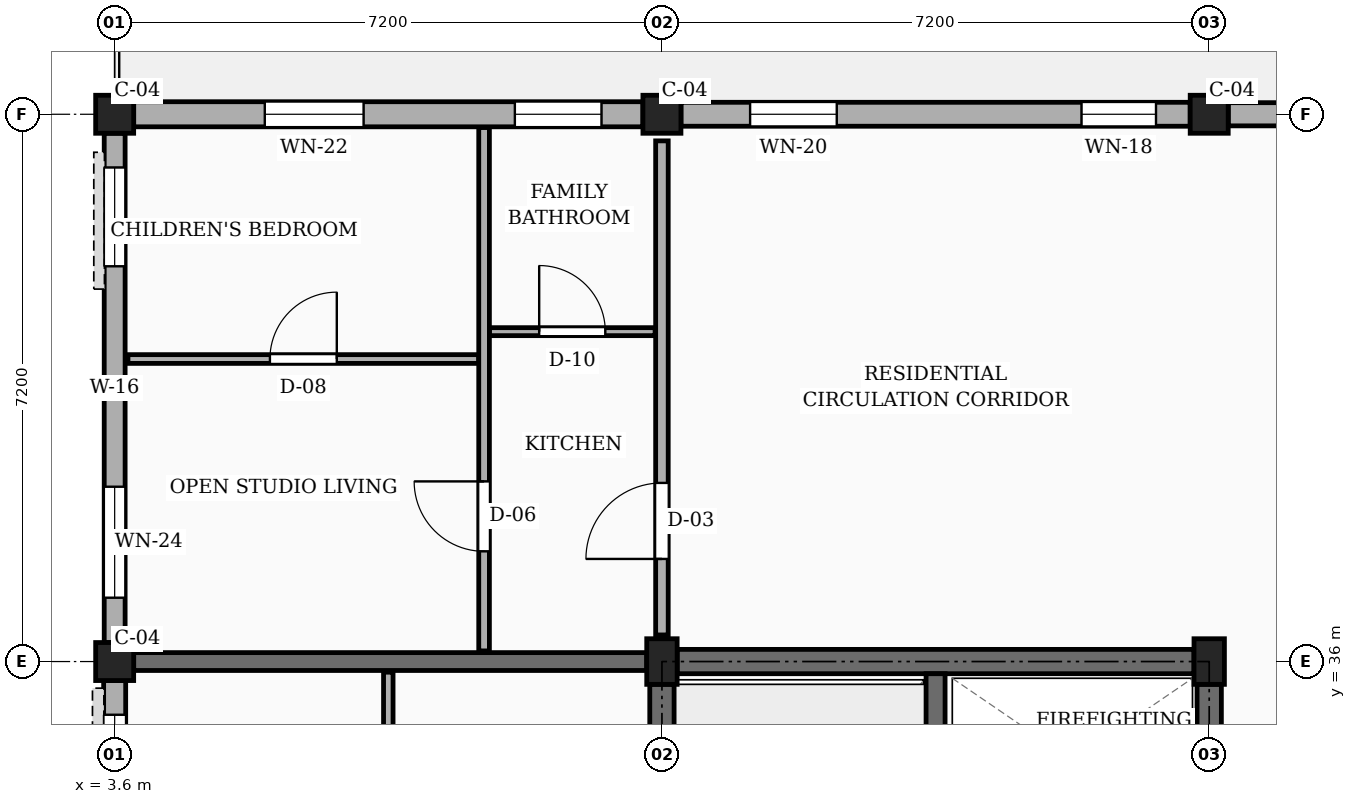
"""IFC4 building model, lengths in metres.
Left out: names, types, materials, properties, quantities, classifications, styles, units other than length and angle.
Written with IfcOpenShell. Run it as: python <this file> out.ifc"""

import sys

from ifc_helpers import new_model, si_unit, direction, frame, frame_2d, origin, origin_2d, place, context, subcontext, project, spatial, rectangle, extrude, element, fill, save


model = new_model("IFC4")
c1 = context("Model", 3, precision=1e-05, world=origin(), true_north=direction((0.0, 1.0)))
c2 = subcontext(c1, "Body", "Model", "MODEL_VIEW")
j1 = project(units=[si_unit("LENGTHUNIT", "METRE"), si_unit("PLANEANGLEUNIT", "RADIAN")], contexts=[c1])
p1 = place(None, origin())
s1 = spatial("IfcSite", under=j1, at=p1, CompositionType="ELEMENT")
p2 = place(p1, origin())
s2 = spatial("IfcBuilding", under=s1, at=p2, CompositionType="ELEMENT")
p3 = place(p2, frame((0.0, 0.0, 23.4)))
s3 = spatial("IfcBuildingStorey", under=s2, at=p3, CompositionType="ELEMENT", Elevation=23.4)
for number, where, z_axis, x_axis in (
    (1, (3.6, 36.0, 0.0), (0.0, 0.0, 1.0), (1.0, 0.0, 0.0)),
    (2, (3.6, 43.2, 0.0), (0.0, 0.0, 1.0), (1.0, 0.0, 0.0)),
):
    element("IfcColumn", number, at=place(p3, frame(where, z_axis=z_axis, x_axis=x_axis)), inside=s3, PredefinedType="COLUMN", context=c2, shape_type="SweptSolid", body=[
        extrude(rectangle(XDim=0.5, YDim=0.5, at=origin_2d()), origin(), (0.0, 0.0, 1.0), 3.15),
    ])
p4 = place(p3, frame((10.8, 36.0, 0.0), z_axis=(0.0, 0.0, 1.0), x_axis=(1.0, 0.0, 0.0)))
e3 = element("IfcColumn", 3, at=p4, inside=s3, PredefinedType="COLUMN", context=c2, shape_type="SweptSolid", body=[
    extrude(rectangle(XDim=0.4, YDim=0.6, at=origin_2d()), origin(), (0.0, 0.0, 1.0), 3.15),
])
p5 = place(p3, frame((10.8, 43.2, 0.0), z_axis=(0.0, 0.0, 1.0), x_axis=(1.0, 0.0, 0.0)))
e4 = element("IfcColumn", 4, at=p5, inside=s3, PredefinedType="COLUMN", context=c2, shape_type="SweptSolid", body=[
    extrude(rectangle(XDim=0.5, YDim=0.5, at=origin_2d()), origin(), (0.0, 0.0, 1.0), 3.15),
])
p6 = place(p3, frame((18.0, 36.0, 0.0), z_axis=(0.0, 0.0, 1.0), x_axis=(1.0, 0.0, 0.0)))
e5 = element("IfcColumn", 5, at=p6, inside=s3, PredefinedType="COLUMN", context=c2, shape_type="SweptSolid", body=[
    extrude(rectangle(XDim=0.4, YDim=0.6, at=origin_2d()), origin(), (0.0, 0.0, 1.0), 3.15),
])
p7 = place(p3, frame((18.0, 43.2, 0.0), z_axis=(0.0, 0.0, 1.0), x_axis=(1.0, 0.0, 0.0)))
e6 = element("IfcColumn", 6, at=p7, inside=s3, PredefinedType="COLUMN", context=c2, shape_type="SweptSolid", body=[
    extrude(rectangle(XDim=0.5, YDim=0.5, at=origin_2d()), origin(), (0.0, 0.0, 1.0), 3.15),
])
p8 = place(p3, frame((3.85, 36.0, 0.0), z_axis=(0.0, 0.0, 1.0), x_axis=(1.0, 0.0, 0.0)))
e7 = element("IfcWall", 7, at=p8, inside=s3, PredefinedType="SOLIDWALL", context=c2, shape_type="SweptSolid", body=[
    extrude(rectangle(XDim=6.75, YDim=0.235, at=frame_2d((3.375, 0.0))), origin(), (0.0, 0.0, 1.0), 2.17),
])
p9 = place(p3, frame((24.95, 43.2, 0.0), z_axis=(0.0, 0.0, 1.0), x_axis=(-1.0, 0.0, 0.0)))
e8 = element("IfcWall", 8, at=p9, inside=s3, PredefinedType="SOLIDWALL", context=c2, shape_type="SweptSolid", body=[
    extrude(rectangle(XDim=6.7, YDim=0.305, at=frame_2d((3.35, 0.0))), origin(), (0.0, 0.0, 1.0), 2.44),
])
p10 = place(p9, frame((2.8, 0.0, 0.0)))
e9 = element("IfcOpeningElement", 9, at=p10, cuts=e8, PredefinedType="OPENING", context=c2, shape_type="SweptSolid", body=[
    extrude(rectangle(XDim=1.44, YDim=2.12, at=frame_2d((0.72, 1.06))), frame((0.0, 0.163, 0.0), z_axis=(0.0, -1.0, 0.0), x_axis=(1.0, 0.0, 0.0)), (0.0, 0.0, 1.0), 0.325),
])
p11 = place(p9, frame((0.65, 0.0, 0.78)))
e10 = element("IfcOpeningElement", 10, at=p11, cuts=e8, PredefinedType="OPENING", context=c2, shape_type="SweptSolid", body=[
    extrude(rectangle(XDim=1.16, YDim=1.15, at=frame_2d((0.58, 0.575))), frame((0.0, 0.163, 0.0), z_axis=(0.0, -1.0, 0.0), x_axis=(1.0, 0.0, 0.0)), (0.0, 0.0, 1.0), 0.325),
])
p12 = place(p3, frame((17.75, 43.2, 0.0), z_axis=(0.0, 0.0, 1.0), x_axis=(-1.0, 0.0, 0.0)))
e11 = element("IfcWall", 11, at=p12, inside=s3, PredefinedType="SOLIDWALL", context=c2, shape_type="SweptSolid", body=[
    extrude(rectangle(XDim=6.7, YDim=0.315, at=frame_2d((3.35, 0.0))), origin(), (0.0, 0.0, 1.0), 2.44),
])
p13 = place(p12, frame((0.45, 0.0, 0.78)))
e12 = element("IfcOpeningElement", 12, at=p13, cuts=e11, PredefinedType="OPENING", context=c2, shape_type="SweptSolid", body=[
    extrude(rectangle(XDim=0.98, YDim=1.36, at=frame_2d((0.49, 0.68))), frame((0.0, 0.167, 0.0), z_axis=(0.0, -1.0, 0.0), x_axis=(1.0, 0.0, 0.0)), (0.0, 0.0, 1.0), 0.335),
])
p14 = place(p12, frame((4.65, 0.0, 0.78)))
e13 = element("IfcOpeningElement", 13, at=p14, cuts=e11, PredefinedType="OPENING", context=c2, shape_type="SweptSolid", body=[
    extrude(rectangle(XDim=1.14, YDim=1.36, at=frame_2d((0.57, 0.68))), frame((0.0, 0.167, 0.0), z_axis=(0.0, -1.0, 0.0), x_axis=(1.0, 0.0, 0.0)), (0.0, 0.0, 1.0), 0.335),
])
p15 = place(p3, frame((10.55, 43.2, 0.0), z_axis=(0.0, 0.0, 1.0), x_axis=(-1.0, 0.0, 0.0)))
e14 = element("IfcWall", 14, at=p15, inside=s3, PredefinedType="SOLIDWALL", context=c2, shape_type="SweptSolid", body=[
    extrude(rectangle(XDim=6.7, YDim=0.33, at=frame_2d((3.35, 0.0))), origin(), (0.0, 0.0, 1.0), 2.44),
])
p16 = place(p15, frame((0.545, 0.0, 0.78)))
e15 = element("IfcOpeningElement", 15, at=p16, cuts=e14, PredefinedType="OPENING", context=c2, shape_type="SweptSolid", body=[
    extrude(rectangle(XDim=1.14, YDim=1.36, at=frame_2d((0.57, 0.68))), frame((0.0, 0.175, 0.0), z_axis=(0.0, -1.0, 0.0), x_axis=(1.0, 0.0, 0.0)), (0.0, 0.0, 1.0), 0.35),
])
p17 = place(p15, frame((3.675, 0.0, 0.78)))
e16 = element("IfcOpeningElement", 16, at=p17, cuts=e14, PredefinedType="OPENING", context=c2, shape_type="SweptSolid", body=[
    extrude(rectangle(XDim=1.3, YDim=1.36, at=frame_2d((0.65, 0.68))), frame((0.0, 0.175, 0.0), z_axis=(0.0, -1.0, 0.0), x_axis=(1.0, 0.0, 0.0)), (0.0, 0.0, 1.0), 0.35),
])
p18 = place(p3, frame((3.6, 42.95, 0.0), z_axis=(0.0, 0.0, 1.0), x_axis=(0.0, -1.0, 0.0)))
e17 = element("IfcWall", 17, at=p18, inside=s3, PredefinedType="SOLIDWALL", context=c2, shape_type="SweptSolid", body=[
    extrude(rectangle(XDim=6.7, YDim=0.275, at=frame_2d((3.35, 0.0))), origin(), (0.0, 0.0, 1.0), 2.44),
])
p19 = place(p18, frame((0.45, 0.0, 0.78)))
e18 = element("IfcOpeningElement", 18, at=p19, cuts=e17, PredefinedType="OPENING", context=c2, shape_type="SweptSolid", body=[
    extrude(rectangle(XDim=1.3, YDim=1.36, at=frame_2d((0.65, 0.68))), frame((0.0, 0.147, 0.0), z_axis=(0.0, -1.0, 0.0), x_axis=(1.0, 0.0, 0.0)), (0.0, 0.0, 1.0), 0.295),
])
p20 = place(p18, frame((4.65, 0.0, 0.78)))
e19 = element("IfcOpeningElement", 19, at=p20, cuts=e17, PredefinedType="OPENING", context=c2, shape_type="SweptSolid", body=[
    extrude(rectangle(XDim=1.46, YDim=1.36, at=frame_2d((0.73, 0.68))), frame((0.0, 0.147, 0.0), z_axis=(0.0, -1.0, 0.0), x_axis=(1.0, 0.0, 0.0)), (0.0, 0.0, 1.0), 0.295),
])
p21 = place(p3, frame((3.6, 35.75, 0.0), z_axis=(0.0, 0.0, 1.0), x_axis=(0.0, -1.0, 0.0)))
e20 = element("IfcWall", 20, at=p21, inside=s3, PredefinedType="SOLIDWALL", context=c2, shape_type="SweptSolid", body=[
    extrude(rectangle(XDim=6.7, YDim=0.29, at=frame_2d((3.35, 0.0))), origin(), (0.0, 0.0, 1.0), 2.44),
])
p22 = place(p21, frame((0.45, 0.0, 0.78)))
e21 = element("IfcOpeningElement", 21, at=p22, cuts=e20, PredefinedType="OPENING", context=c2, shape_type="SweptSolid", body=[
    extrude(rectangle(XDim=1.46, YDim=1.36, at=frame_2d((0.73, 0.68))), frame((0.0, 0.155, 0.0), z_axis=(0.0, -1.0, 0.0), x_axis=(1.0, 0.0, 0.0)), (0.0, 0.0, 1.0), 0.31),
])
p23 = place(p21, frame((4.65, 0.0, 0.78)))
e22 = element("IfcOpeningElement", 22, at=p23, cuts=e20, PredefinedType="OPENING", context=c2, shape_type="SweptSolid", body=[
    extrude(rectangle(XDim=1.05, YDim=1.44, at=frame_2d((0.525, 0.72))), frame((0.0, 0.155, 0.0), z_axis=(0.0, -1.0, 0.0), x_axis=(1.0, 0.0, 0.0)), (0.0, 0.0, 1.0), 0.31),
])
p24 = place(p3, frame((10.8, 29.1, 0.0), z_axis=(0.0, 0.0, 1.0), x_axis=(0.0, 1.0, 0.0)))
e23 = element("IfcWall", 23, at=p24, inside=s3, PredefinedType="SHEAR", context=c2, shape_type="SweptSolid", body=[
    extrude(rectangle(XDim=6.6, YDim=0.32, at=frame_2d((3.3, 0.0))), origin(), (0.0, 0.0, 1.0), 2.87),
])
p25 = place(p3, frame((11.0, 36.0, 0.0), z_axis=(0.0, 0.0, 1.0), x_axis=(1.0, 0.0, 0.0)))
e24 = element("IfcWall", 24, at=p25, inside=s3, PredefinedType="SHEAR", context=c2, shape_type="SweptSolid", body=[
    extrude(rectangle(XDim=6.8, YDim=0.32, at=frame_2d((3.4, 0.0))), origin(), (0.0, 0.0, 1.0), 2.87),
])
p26 = place(p3, frame((18.0, 29.1, 0.0), z_axis=(0.0, 0.0, 1.0), x_axis=(0.0, 1.0, 0.0)))
e25 = element("IfcWall", 25, at=p26, inside=s3, PredefinedType="SHEAR", context=c2, shape_type="SweptSolid", body=[
    extrude(rectangle(XDim=6.6, YDim=0.32, at=frame_2d((3.3, 0.0))), origin(), (0.0, 0.0, 1.0), 2.87),
])
p27 = place(p26, frame((1.5, 0.0, 0.0)))
e26 = element("IfcOpeningElement", 26, at=p27, cuts=e25, PredefinedType="OPENING", context=c2, shape_type="SweptSolid", body=[
    extrude(rectangle(XDim=1.1, YDim=2.15, at=frame_2d((0.55, 1.075))), frame((0.0, 0.17, 0.0), z_axis=(0.0, -1.0, 0.0), x_axis=(1.0, 0.0, 0.0)), (0.0, 0.0, 1.0), 0.34),
])
p28 = place(p3, frame((14.4, 28.96, 0.0), z_axis=(0.0, 0.0, 1.0), x_axis=(0.0, 1.0, 0.0)))
e27 = element("IfcWall", 27, at=p28, inside=s3, PredefinedType="SHEAR", context=c2, shape_type="SweptSolid", body=[
    extrude(rectangle(XDim=6.88, YDim=0.25, at=frame_2d((3.44, 0.0))), origin(), (0.0, 0.0, 1.0), 2.87),
])
p29 = place(p28, frame((0.44, 0.0, 0.0)))
e28 = element("IfcOpeningElement", 28, at=p29, cuts=e27, PredefinedType="OPENING", context=c2, shape_type="SweptSolid", body=[
    extrude(rectangle(XDim=1.05, YDim=2.15, at=frame_2d((0.525, 1.075))), frame((0.0, 0.135, 0.0), z_axis=(0.0, -1.0, 0.0), x_axis=(1.0, 0.0, 0.0)), (0.0, 0.0, 1.0), 0.27),
])
p30 = place(p3, frame((10.8, 36.35, 0.0), z_axis=(0.0, 0.0, 1.0), x_axis=(0.0, 1.0, 0.0)))
e29 = element("IfcWall", 29, at=p30, inside=s3, PredefinedType="PARTITIONING", context=c2, shape_type="SweptSolid", body=[
    extrude(rectangle(XDim=6.5, YDim=0.165, at=frame_2d((3.25, 0.0))), origin(), (0.0, 0.0, 1.0), 2.305),
])
p31 = place(p30, frame((1.0, 0.0, 0.0)))
e30 = element("IfcOpeningElement", 30, at=p31, cuts=e29, PredefinedType="OPENING", context=c2, shape_type="SweptSolid", body=[
    extrude(rectangle(XDim=1.0, YDim=2.15, at=frame_2d((0.5, 1.075))), frame((0.0, 0.093, 0.0), z_axis=(0.0, -1.0, 0.0), x_axis=(1.0, 0.0, 0.0)), (0.0, 0.0, 1.0), 0.185),
])
p32 = place(p3, frame((7.2, 28.94, 0.0), z_axis=(0.0, 0.0, 1.0), x_axis=(0.0, 1.0, 0.0)))
e31 = element("IfcWall", 31, at=p32, inside=s3, PredefinedType="PARTITIONING", context=c2, shape_type="SweptSolid", body=[
    extrude(rectangle(XDim=6.92, YDim=0.125, at=frame_2d((3.46, 0.0))), origin(), (0.0, 0.0, 1.0), 2.305),
])
p33 = place(p32, frame((1.05, 0.0, 0.0)))
e32 = element("IfcOpeningElement", 32, at=p33, cuts=e31, PredefinedType="OPENING", context=c2, shape_type="SweptSolid", body=[
    extrude(rectangle(XDim=0.87, YDim=2.05, at=frame_2d((0.435, 1.025))), frame((0.0, 0.073, 0.0), z_axis=(0.0, -1.0, 0.0), x_axis=(1.0, 0.0, 0.0)), (0.0, 0.0, 1.0), 0.145),
])
p34 = place(p32, frame((4.45, 0.0, 0.0)))
e33 = element("IfcOpeningElement", 33, at=p34, cuts=e31, PredefinedType="OPENING", context=c2, shape_type="SweptSolid", body=[
    extrude(rectangle(XDim=0.88, YDim=2.08, at=frame_2d((0.44, 1.04))), frame((0.0, 0.073, 0.0), z_axis=(0.0, -1.0, 0.0), x_axis=(1.0, 0.0, 0.0)), (0.0, 0.0, 1.0), 0.145),
])
p35 = place(p3, frame((3.775, 39.98, 0.0), z_axis=(0.0, 0.0, 1.0), x_axis=(1.0, 0.0, 0.0)))
e34 = element("IfcWall", 34, at=p35, inside=s3, PredefinedType="PARTITIONING", context=c2, shape_type="SweptSolid", body=[
    extrude(rectangle(XDim=4.615, YDim=0.115, at=frame_2d((2.308, 0.0))), origin(), (0.0, 0.0, 1.0), 2.305),
])
p36 = place(p35, frame((1.867, 0.0, 0.0)))
e35 = element("IfcOpeningElement", 35, at=p36, cuts=e34, PredefinedType="OPENING", context=c2, shape_type="SweptSolid", body=[
    extrude(rectangle(XDim=0.88, YDim=2.08, at=frame_2d((0.44, 1.04))), frame((0.0, 0.067, 0.0), z_axis=(0.0, -1.0, 0.0), x_axis=(1.0, 0.0, 0.0)), (0.0, 0.0, 1.0), 0.135),
])
p37 = place(p3, frame((8.53, 40.34, 0.0), z_axis=(0.0, 0.0, 1.0), x_axis=(1.0, 0.0, 0.0)))
e36 = element("IfcWall", 36, at=p37, inside=s3, PredefinedType="PARTITIONING", context=c2, shape_type="SweptSolid", body=[
    extrude(rectangle(XDim=2.18, YDim=0.105, at=frame_2d((1.09, 0.0))), origin(), (0.0, 0.0, 1.0), 2.305),
])
p38 = place(p37, frame((0.655, 0.0, 0.0)))
e37 = element("IfcOpeningElement", 37, at=p38, cuts=e36, PredefinedType="OPENING", context=c2, shape_type="SweptSolid", body=[
    extrude(rectangle(XDim=0.87, YDim=2.05, at=frame_2d((0.435, 1.025))), frame((0.0, 0.062, 0.0), z_axis=(0.0, -1.0, 0.0), x_axis=(1.0, 0.0, 0.0)), (0.0, 0.0, 1.0), 0.125),
])
p39 = place(p3, frame((8.46, 36.14, 0.0), z_axis=(0.0, 0.0, 1.0), x_axis=(0.0, 1.0, 0.0)))
e38 = element("IfcWall", 38, at=p39, inside=s3, PredefinedType="PARTITIONING", context=c2, shape_type="SweptSolid", body=[
    extrude(rectangle(XDim=6.885, YDim=0.14, at=frame_2d((3.442, 0.0))), origin(), (0.0, 0.0, 1.0), 2.305),
])
p40 = place(p39, frame((1.31, 0.0, 0.0)))
e39 = element("IfcOpeningElement", 39, at=p40, cuts=e38, PredefinedType="OPENING", context=c2, shape_type="SweptSolid", body=[
    extrude(rectangle(XDim=0.92, YDim=2.1, at=frame_2d((0.46, 1.05))), frame((0.0, 0.08, 0.0), z_axis=(0.0, -1.0, 0.0), x_axis=(1.0, 0.0, 0.0)), (0.0, 0.0, 1.0), 0.16),
])
p41 = place(p13, origin())
e40 = element("IfcWindow", 40, at=p41, inside=s3, PartitioningType="SINGLE_PANEL", PredefinedType="WINDOW", context=c2, shape_type="SweptSolid", body=[
    extrude(rectangle(XDim=0.98, YDim=1.36, at=frame_2d((0.49, 0.68))), frame((0.0, 0.03, 0.0), z_axis=(0.0, -1.0, 0.0), x_axis=(1.0, 0.0, 0.0)), (0.0, 0.0, 1.0), 0.06),
])
fill(e12, e40)
p42 = place(p14, origin())
e41 = element("IfcWindow", 41, at=p42, inside=s3, PartitioningType="SINGLE_PANEL", PredefinedType="WINDOW", context=c2, shape_type="SweptSolid", body=[
    extrude(rectangle(XDim=1.14, YDim=1.36, at=frame_2d((0.57, 0.68))), frame((0.0, 0.03, 0.0), z_axis=(0.0, -1.0, 0.0), x_axis=(1.0, 0.0, 0.0)), (0.0, 0.0, 1.0), 0.06),
])
fill(e13, e41)
p43 = place(p16, origin())
e42 = element("IfcWindow", 42, at=p43, inside=s3, PartitioningType="SINGLE_PANEL", PredefinedType="WINDOW", context=c2, shape_type="SweptSolid", body=[
    extrude(rectangle(XDim=1.14, YDim=1.36, at=frame_2d((0.57, 0.68))), frame((0.0, 0.03, 0.0), z_axis=(0.0, -1.0, 0.0), x_axis=(1.0, 0.0, 0.0)), (0.0, 0.0, 1.0), 0.06),
])
fill(e15, e42)
p44 = place(p17, origin())
e43 = element("IfcWindow", 43, at=p44, inside=s3, PartitioningType="SINGLE_PANEL", PredefinedType="WINDOW", context=c2, shape_type="SweptSolid", body=[
    extrude(rectangle(XDim=1.3, YDim=1.36, at=frame_2d((0.65, 0.68))), frame((0.0, 0.03, 0.0), z_axis=(0.0, -1.0, 0.0), x_axis=(1.0, 0.0, 0.0)), (0.0, 0.0, 1.0), 0.06),
])
fill(e16, e43)
p45 = place(p19, origin())
e44 = element("IfcWindow", 44, at=p45, inside=s3, PartitioningType="SINGLE_PANEL", PredefinedType="WINDOW", context=c2, shape_type="SweptSolid", body=[
    extrude(rectangle(XDim=1.3, YDim=1.36, at=frame_2d((0.65, 0.68))), frame((0.0, 0.03, 0.0), z_axis=(0.0, -1.0, 0.0), x_axis=(1.0, 0.0, 0.0)), (0.0, 0.0, 1.0), 0.06),
])
fill(e18, e44)
p46 = place(p20, origin())
e45 = element("IfcWindow", 45, at=p46, inside=s3, PartitioningType="SINGLE_PANEL", PredefinedType="WINDOW", context=c2, shape_type="SweptSolid", body=[
    extrude(rectangle(XDim=1.46, YDim=1.36, at=frame_2d((0.73, 0.68))), frame((0.0, 0.03, 0.0), z_axis=(0.0, -1.0, 0.0), x_axis=(1.0, 0.0, 0.0)), (0.0, 0.0, 1.0), 0.06),
])
fill(e19, e45)
p47 = place(p22, origin())
e46 = element("IfcWindow", 46, at=p47, inside=s3, PartitioningType="SINGLE_PANEL", PredefinedType="WINDOW", context=c2, shape_type="SweptSolid", body=[
    extrude(rectangle(XDim=1.46, YDim=1.36, at=frame_2d((0.73, 0.68))), frame((0.0, 0.03, 0.0), z_axis=(0.0, -1.0, 0.0), x_axis=(1.0, 0.0, 0.0)), (0.0, 0.0, 1.0), 0.06),
])
fill(e21, e46)
p48 = place(p31, origin())
e47 = element("IfcDoor", 47, at=p48, inside=s3, OperationType="SINGLE_SWING_LEFT", PredefinedType="DOOR", context=c2, shape_type="SweptSolid", body=[
    extrude(rectangle(XDim=1.0, YDim=2.15, at=frame_2d((0.5, 1.075))), frame((0.0, 0.025, 0.0), z_axis=(0.0, -1.0, 0.0), x_axis=(1.0, 0.0, 0.0)), (0.0, 0.0, 1.0), 0.05),
])
fill(e30, e47)
p49 = place(p36, origin())
e48 = element("IfcDoor", 48, at=p49, inside=s3, OperationType="SINGLE_SWING_RIGHT", PredefinedType="DOOR", context=c2, shape_type="SweptSolid", body=[
    extrude(rectangle(XDim=0.88, YDim=2.08, at=frame_2d((0.44, 1.04))), frame((0.0, 0.025, 0.0), z_axis=(0.0, -1.0, 0.0), x_axis=(1.0, 0.0, 0.0)), (0.0, 0.0, 1.0), 0.05),
])
fill(e35, e48)
p50 = place(p38, origin())
e49 = element("IfcDoor", 49, at=p50, inside=s3, OperationType="SINGLE_SWING_LEFT", PredefinedType="DOOR", context=c2, shape_type="SweptSolid", body=[
    extrude(rectangle(XDim=0.87, YDim=2.05, at=frame_2d((0.435, 1.025))), frame((0.0, 0.025, 0.0), z_axis=(0.0, -1.0, 0.0), x_axis=(1.0, 0.0, 0.0)), (0.0, 0.0, 1.0), 0.05),
])
fill(e37, e49)
p51 = place(p40, origin())
e50 = element("IfcDoor", 50, at=p51, inside=s3, OperationType="SINGLE_SWING_RIGHT", PredefinedType="DOOR", context=c2, shape_type="SweptSolid", body=[
    extrude(rectangle(XDim=0.92, YDim=2.1, at=frame_2d((0.46, 1.05))), frame((0.0, 0.025, 0.0), z_axis=(0.0, -1.0, 0.0), x_axis=(1.0, 0.0, 0.0)), (0.0, 0.0, 1.0), 0.05),
])
fill(e39, e50)
save(model, sys.argv[1])
